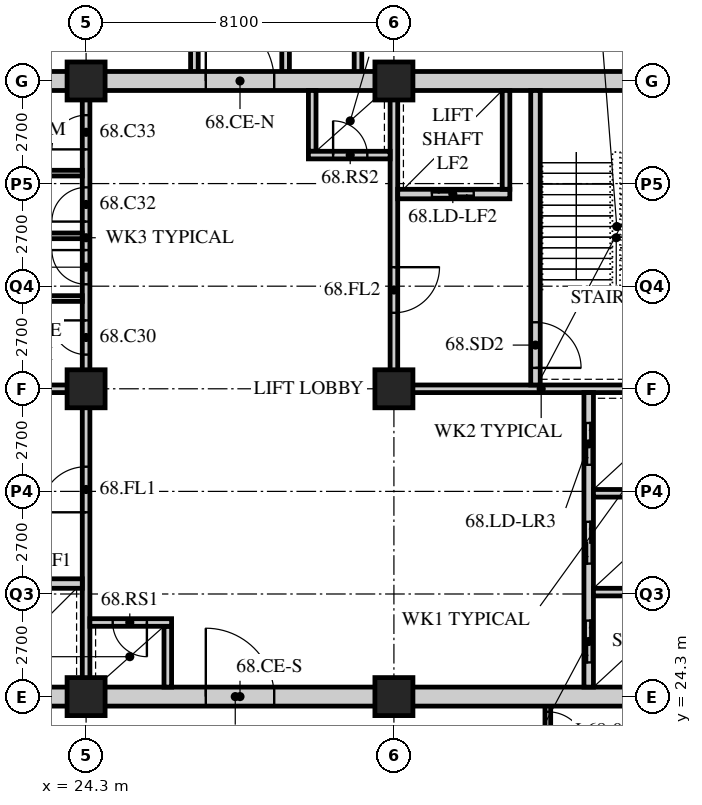
"""IFC4 building model, lengths in metres.
Left out: names, types, materials, properties, quantities, classifications, styles, units other than length and angle.
Written with IfcOpenShell. Run it as: python <this file> out.ifc"""

import sys

from ifc_helpers import new_model, si_unit, direction, frame, frame_2d, origin, origin_2d, place, context, subcontext, project, spatial, rectangle, hollow_rectangle, extrude, element, fill, save


model = new_model("IFC4")
c1 = context("Model", 3, precision=1e-05, world=origin(), true_north=direction((0.0, 1.0)))
c2 = subcontext(c1, "Body", "Model", "MODEL_VIEW")
j1 = project(units=[si_unit("LENGTHUNIT", "METRE"), si_unit("PLANEANGLEUNIT", "RADIAN")], contexts=[c1])
p1 = place(None, origin())
s1 = spatial("IfcSite", under=j1, at=p1, CompositionType="ELEMENT")
p2 = place(p1, origin())
s2 = spatial("IfcBuilding", under=s1, at=p2, CompositionType="ELEMENT")
p3 = place(p2, frame((0.0, 0.0, 265.8)))
s3 = spatial("IfcBuildingStorey", under=s2, at=p3, CompositionType="ELEMENT", Elevation=265.8)
for number, where, z_axis, x_axis in (
    (1, (24.3, 24.3, 0.0), (0.0, 0.0, 1.0), (1.0, 0.0, 0.0)),
    (2, (24.3, 32.4, 0.0), (0.0, 0.0, 1.0), (1.0, 0.0, 0.0)),
    (3, (24.3, 40.5, 0.0), (0.0, 0.0, 1.0), (1.0, 0.0, 0.0)),
    (4, (32.4, 24.3, 0.0), (0.0, 0.0, 1.0), (1.0, 0.0, 0.0)),
    (5, (32.4, 32.4, 0.0), (0.0, 0.0, 1.0), (1.0, 0.0, 0.0)),
    (6, (32.4, 40.5, 0.0), (0.0, 0.0, 1.0), (1.0, 0.0, 0.0)),
):
    element("IfcColumn", number, at=place(p3, frame(where, z_axis=z_axis, x_axis=x_axis)), inside=s3, PredefinedType="COLUMN", context=c2, shape_type="SweptSolid", body=[
        extrude(hollow_rectangle(XDim=1.0, YDim=1.0, WallThickness=0.1, at=origin_2d()), origin(), (0.0, 0.0, 1.0), 3.9),
    ])
for number, where, z_axis, x_axis in (
    (7, (31.455, 46.8, 0.0), (0.0, 0.0, 1.0), (0.0, -1.0, 0.0)),
    (8, (27.15, 40.5, 0.0), (0.0, 0.0, 1.0), (0.0, 1.0, 0.0)),
    (9, (29.55, 40.5, 0.0), (0.0, 0.0, 1.0), (0.0, 1.0, 0.0)),
):
    element("IfcWall", number, at=place(p3, frame(where, z_axis=z_axis, x_axis=x_axis)), inside=s3, PredefinedType="SOLIDWALL", context=c2, shape_type="SweptSolid", body=[
        extrude(rectangle(XDim=6.3, YDim=0.2, at=frame_2d((3.15, 0.0))), origin(), (0.0, 0.0, 1.0), 3.69),
    ])
p4 = place(p3, frame((36.45, 22.5, 0.0), z_axis=(0.0, 0.0, 1.0), x_axis=(0.0, 1.0, 0.0)))
e10 = element("IfcWall", 10, at=p4, inside=s3, PredefinedType="PARTITIONING", context=c2, shape_type="SweptSolid", body=[
    extrude(rectangle(XDim=1.8, YDim=0.15, at=frame_2d((0.9, 0.0))), origin(), (0.0, 0.0, 1.0), 3.69),
])
p5 = place(p4, frame((0.4, 0.0, 0.0)))
e11 = element("IfcOpeningElement", 11, at=p5, cuts=e10, PredefinedType="OPENING", context=c2, shape_type="SweptSolid", body=[
    extrude(rectangle(XDim=1.0, YDim=2.1, at=frame_2d((0.5, 1.05))), frame((0.0, 0.085, 0.0), z_axis=(0.0, -1.0, 0.0), x_axis=(1.0, 0.0, 0.0)), (0.0, 0.0, 1.0), 0.17),
])
p6 = place(p3, frame((15.95, 24.3, 0.0), z_axis=(0.0, 0.0, 1.0), x_axis=(1.0, 0.0, 0.0)))
e12 = element("IfcWall", 12, at=p6, inside=s3, PredefinedType="SOLIDWALL", context=c2, shape_type="SweptSolid", body=[
    extrude(rectangle(XDim=24.55, YDim=0.5, at=frame_2d((12.275, 0.0))), origin(), (0.0, 0.0, 1.0), 3.04),
])
p7 = place(p6, frame((11.5, 0.0, 0.0)))
e13 = element("IfcOpeningElement", 13, at=p7, cuts=e12, PredefinedType="OPENING", context=c2, shape_type="SweptSolid", body=[
    extrude(rectangle(XDim=1.8, YDim=2.4, at=frame_2d((0.9, 1.2))), frame((0.0, 0.26, 0.0), z_axis=(0.0, -1.0, 0.0), x_axis=(1.0, 0.0, 0.0)), (0.0, 0.0, 1.0), 0.52),
])
p8 = place(p3, frame((15.95, 40.5, 0.0), z_axis=(0.0, 0.0, 1.0), x_axis=(1.0, 0.0, 0.0)))
e14 = element("IfcWall", 14, at=p8, inside=s3, PredefinedType="SOLIDWALL", context=c2, shape_type="SweptSolid", body=[
    extrude(rectangle(XDim=24.55, YDim=0.5, at=frame_2d((12.275, 0.0))), origin(), (0.0, 0.0, 1.0), 3.04),
])
p9 = place(p8, frame((11.5, 0.0, 0.0)))
e15 = element("IfcOpeningElement", 15, at=p9, cuts=e14, PredefinedType="OPENING", context=c2, shape_type="SweptSolid", body=[
    extrude(rectangle(XDim=1.8, YDim=2.4, at=frame_2d((0.9, 1.2))), frame((0.0, 0.26, 0.0), z_axis=(0.0, -1.0, 0.0), x_axis=(1.0, 0.0, 0.0)), (0.0, 0.0, 1.0), 0.52),
])
p10 = place(p3, frame((16.45, 32.4, 0.0), z_axis=(0.0, 0.0, 1.0), x_axis=(1.0, 0.0, 0.0)))
e16 = element("IfcWall", 16, at=p10, inside=s3, PredefinedType="SOLIDWALL", context=c2, shape_type="SweptSolid", body=[
    extrude(rectangle(XDim=7.95, YDim=0.2, at=frame_2d((3.975, 0.0))), origin(), (0.0, 0.0, 1.0), 3.078),
])
p11 = place(p3, frame((24.3, 24.55, 0.0), z_axis=(0.0, 0.0, 1.0), x_axis=(0.0, 1.0, 0.0)))
e17 = element("IfcWall", 17, at=p11, inside=s3, PredefinedType="SOLIDWALL", context=c2, shape_type="SweptSolid", body=[
    extrude(rectangle(XDim=7.75, YDim=0.2, at=frame_2d((3.875, 0.0))), origin(), (0.0, 0.0, 1.0), 3.078),
])
p12 = place(p11, frame((4.6, 0.0, 0.0)))
e18 = element("IfcOpeningElement", 18, at=p12, cuts=e17, PredefinedType="OPENING", context=c2, shape_type="SweptSolid", body=[
    extrude(rectangle(XDim=1.2, YDim=2.1, at=frame_2d((0.6, 1.05))), frame((0.0, 0.11, 0.0), z_axis=(0.0, -1.0, 0.0), x_axis=(1.0, 0.0, 0.0)), (0.0, 0.0, 1.0), 0.22),
])
p13 = place(p3, frame((21.25, 27.275, 0.0), z_axis=(0.0, 0.0, 1.0), x_axis=(1.0, 0.0, 0.0)))
e19 = element("IfcWall", 19, at=p13, inside=s3, PredefinedType="SOLIDWALL", context=c2, shape_type="SweptSolid", body=[
    extrude(rectangle(XDim=2.95, YDim=0.25, at=frame_2d((1.475, 0.0))), origin(), (0.0, 0.0, 1.0), 3.69),
])
p14 = place(p13, frame((0.95, 0.0, 0.0)))
e20 = element("IfcOpeningElement", 20, at=p14, cuts=e19, PredefinedType="OPENING", context=c2, shape_type="SweptSolid", body=[
    extrude(rectangle(XDim=1.1, YDim=2.4, at=frame_2d((0.55, 1.2))), frame((0.0, 0.135, 0.0), z_axis=(0.0, -1.0, 0.0), x_axis=(1.0, 0.0, 0.0)), (0.0, 0.0, 1.0), 0.27),
])
p15 = place(p3, frame((26.45, 24.55, 0.0), z_axis=(0.0, 0.0, 1.0), x_axis=(0.0, 1.0, 0.0)))
e21 = element("IfcWall", 21, at=p15, inside=s3, PredefinedType="SOLIDWALL", context=c2, shape_type="SweptSolid", body=[
    extrude(rectangle(XDim=1.6, YDim=0.2, at=frame_2d((0.8, 0.0))), origin(), (0.0, 0.0, 1.0), 3.69),
])
p16 = place(p3, frame((24.4, 26.25, 0.0), z_axis=(0.0, 0.0, 1.0), x_axis=(1.0, 0.0, 0.0)))
e22 = element("IfcWall", 22, at=p16, inside=s3, PredefinedType="SOLIDWALL", context=c2, shape_type="SweptSolid", body=[
    extrude(rectangle(XDim=2.15, YDim=0.2, at=frame_2d((1.075, 0.0))), origin(), (0.0, 0.0, 1.0), 3.69),
])
p17 = place(p16, frame((0.6, 0.0, 0.0)))
e23 = element("IfcOpeningElement", 23, at=p17, cuts=e22, PredefinedType="OPENING", context=c2, shape_type="SweptSolid", body=[
    extrude(rectangle(XDim=0.9, YDim=2.1, at=frame_2d((0.45, 1.05))), frame((0.0, 0.11, 0.0), z_axis=(0.0, -1.0, 0.0), x_axis=(1.0, 0.0, 0.0)), (0.0, 0.0, 1.0), 0.22),
])
p18 = place(p3, frame((32.3, 32.4, 0.0), z_axis=(0.0, 0.0, 1.0), x_axis=(1.0, 0.0, 0.0)))
e24 = element("IfcWall", 24, at=p18, inside=s3, PredefinedType="SOLIDWALL", context=c2, shape_type="SweptSolid", body=[
    extrude(rectangle(XDim=7.95, YDim=0.2, at=frame_2d((3.975, 0.0))), origin(), (0.0, 0.0, 1.0), 3.078),
])
p19 = place(p3, frame((32.4, 32.5, 0.0), z_axis=(0.0, 0.0, 1.0), x_axis=(0.0, 1.0, 0.0)))
e25 = element("IfcWall", 25, at=p19, inside=s3, PredefinedType="SOLIDWALL", context=c2, shape_type="SweptSolid", body=[
    extrude(rectangle(XDim=7.75, YDim=0.2, at=frame_2d((3.875, 0.0))), origin(), (0.0, 0.0, 1.0), 3.078),
])
p20 = place(p19, frame((1.9, 0.0, 0.0)))
e26 = element("IfcOpeningElement", 26, at=p20, cuts=e25, PredefinedType="OPENING", context=c2, shape_type="SweptSolid", body=[
    extrude(rectangle(XDim=1.2, YDim=2.1, at=frame_2d((0.6, 1.05))), frame((0.0, 0.11, 0.0), z_axis=(0.0, -1.0, 0.0), x_axis=(1.0, 0.0, 0.0)), (0.0, 0.0, 1.0), 0.22),
])
p21 = place(p3, frame((37.525, 24.55, 0.0), z_axis=(0.0, 0.0, 1.0), x_axis=(0.0, 1.0, 0.0)))
e27 = element("IfcWall", 27, at=p21, inside=s3, PredefinedType="SOLIDWALL", context=c2, shape_type="SweptSolid", body=[
    extrude(rectangle(XDim=7.75, YDim=0.25, at=frame_2d((3.875, 0.0))), origin(), (0.0, 0.0, 1.0), 3.69),
])
p22 = place(p21, frame((0.65, 0.0, 0.0)))
e28 = element("IfcOpeningElement", 28, at=p22, cuts=e27, PredefinedType="OPENING", context=c2, shape_type="SweptSolid", body=[
    extrude(rectangle(XDim=1.1, YDim=2.4, at=frame_2d((0.55, 1.2))), frame((0.0, 0.135, 0.0), z_axis=(0.0, -1.0, 0.0), x_axis=(1.0, 0.0, 0.0)), (0.0, 0.0, 1.0), 0.27),
])
p23 = place(p21, frame((3.25, 0.0, 0.0)))
e29 = element("IfcOpeningElement", 29, at=p23, cuts=e27, PredefinedType="OPENING", context=c2, shape_type="SweptSolid", body=[
    extrude(rectangle(XDim=1.1, YDim=2.4, at=frame_2d((0.55, 1.2))), frame((0.0, 0.135, 0.0), z_axis=(0.0, -1.0, 0.0), x_axis=(1.0, 0.0, 0.0)), (0.0, 0.0, 1.0), 0.27),
])
p24 = place(p21, frame((5.85, 0.0, 0.0)))
e30 = element("IfcOpeningElement", 30, at=p24, cuts=e27, PredefinedType="OPENING", context=c2, shape_type="SweptSolid", body=[
    extrude(rectangle(XDim=1.1, YDim=2.4, at=frame_2d((0.55, 1.2))), frame((0.0, 0.135, 0.0), z_axis=(0.0, -1.0, 0.0), x_axis=(1.0, 0.0, 0.0)), (0.0, 0.0, 1.0), 0.27),
])
for number, where, z_axis, x_axis in (
    (31, (37.65, 27.05, 0.0), (0.0, 0.0, 1.0), (1.0, 0.0, 0.0)),
    (32, (37.65, 29.65, 0.0), (0.0, 0.0, 1.0), (1.0, 0.0, 0.0)),
):
    element("IfcWall", number, at=place(p3, frame(where, z_axis=z_axis, x_axis=x_axis)), inside=s3, PredefinedType="SOLIDWALL", context=c2, shape_type="SweptSolid", body=[
        extrude(rectangle(XDim=2.6, YDim=0.2, at=frame_2d((1.3, 0.0))), origin(), (0.0, 0.0, 1.0), 3.69),
    ])
p25 = place(p3, frame((36.125, 32.5, 0.0), z_axis=(0.0, 0.0, 1.0), x_axis=(0.0, 1.0, 0.0)))
e33 = element("IfcWall", 33, at=p25, inside=s3, PredefinedType="SOLIDWALL", context=c2, shape_type="SweptSolid", body=[
    extrude(rectangle(XDim=7.75, YDim=0.25, at=frame_2d((3.875, 0.0))), origin(), (0.0, 0.0, 1.0), 3.69),
])
p26 = place(p25, frame((0.45, 0.0, 0.0)))
e34 = element("IfcOpeningElement", 34, at=p26, cuts=e33, PredefinedType="OPENING", context=c2, shape_type="SweptSolid", body=[
    extrude(rectangle(XDim=1.2, YDim=2.1, at=frame_2d((0.6, 1.05))), frame((0.0, 0.135, 0.0), z_axis=(0.0, -1.0, 0.0), x_axis=(1.0, 0.0, 0.0)), (0.0, 0.0, 1.0), 0.27),
])
p27 = place(p3, frame((32.5, 37.525, 0.0), z_axis=(0.0, 0.0, 1.0), x_axis=(1.0, 0.0, 0.0)))
e35 = element("IfcWall", 35, at=p27, inside=s3, PredefinedType="SOLIDWALL", context=c2, shape_type="SweptSolid", body=[
    extrude(rectangle(XDim=2.95, YDim=0.25, at=frame_2d((1.475, 0.0))), origin(), (0.0, 0.0, 1.0), 3.69),
])
p28 = place(p27, frame((0.9, 0.0, 0.0)))
e36 = element("IfcOpeningElement", 36, at=p28, cuts=e35, PredefinedType="OPENING", context=c2, shape_type="SweptSolid", body=[
    extrude(rectangle(XDim=1.1, YDim=2.4, at=frame_2d((0.55, 1.2))), frame((0.0, 0.135, 0.0), z_axis=(0.0, -1.0, 0.0), x_axis=(1.0, 0.0, 0.0)), (0.0, 0.0, 1.0), 0.27),
])
p29 = place(p3, frame((35.35, 37.65, 0.0), z_axis=(0.0, 0.0, 1.0), x_axis=(0.0, 1.0, 0.0)))
e37 = element("IfcWall", 37, at=p29, inside=s3, PredefinedType="SOLIDWALL", context=c2, shape_type="SweptSolid", body=[
    extrude(rectangle(XDim=2.6, YDim=0.2, at=frame_2d((1.3, 0.0))), origin(), (0.0, 0.0, 1.0), 3.69),
])
p30 = place(p3, frame((30.25, 38.65, 0.0), z_axis=(0.0, 0.0, 1.0), x_axis=(0.0, 1.0, 0.0)))
e38 = element("IfcWall", 38, at=p30, inside=s3, PredefinedType="SOLIDWALL", context=c2, shape_type="SweptSolid", body=[
    extrude(rectangle(XDim=1.6, YDim=0.2, at=frame_2d((0.8, 0.0))), origin(), (0.0, 0.0, 1.0), 3.69),
])
p31 = place(p3, frame((30.15, 38.55, 0.0), z_axis=(0.0, 0.0, 1.0), x_axis=(1.0, 0.0, 0.0)))
e39 = element("IfcWall", 39, at=p31, inside=s3, PredefinedType="SOLIDWALL", context=c2, shape_type="SweptSolid", body=[
    extrude(rectangle(XDim=2.15, YDim=0.2, at=frame_2d((1.075, 0.0))), origin(), (0.0, 0.0, 1.0), 3.69),
])
p32 = place(p31, frame((0.65, 0.0, 0.0)))
e40 = element("IfcOpeningElement", 40, at=p32, cuts=e39, PredefinedType="OPENING", context=c2, shape_type="SweptSolid", body=[
    extrude(rectangle(XDim=0.9, YDim=2.1, at=frame_2d((0.45, 1.05))), frame((0.0, 0.11, 0.0), z_axis=(0.0, -1.0, 0.0), x_axis=(1.0, 0.0, 0.0)), (0.0, 0.0, 1.0), 0.22),
])
p33 = place(p3, frame((24.3, 32.5, 0.0), z_axis=(0.0, 0.0, 1.0), x_axis=(0.0, 1.0, 0.0)))
e41 = element("IfcWall", 41, at=p33, inside=s3, PredefinedType="PARTITIONING", context=c2, shape_type="SweptSolid", body=[
    extrude(rectangle(XDim=7.75, YDim=0.2, at=frame_2d((3.875, 0.0))), origin(), (0.0, 0.0, 1.0), 3.078),
])
p34 = place(p33, frame((0.8, 0.0, 0.0)))
e42 = element("IfcOpeningElement", 42, at=p34, cuts=e41, PredefinedType="OPENING", context=c2, shape_type="SweptSolid", body=[
    extrude(rectangle(XDim=0.9, YDim=2.1, at=frame_2d((0.45, 1.05))), frame((0.0, 0.11, 0.0), z_axis=(0.0, -1.0, 0.0), x_axis=(1.0, 0.0, 0.0)), (0.0, 0.0, 1.0), 0.22),
])
p35 = place(p33, frame((2.65, 0.0, 0.0)))
e43 = element("IfcOpeningElement", 43, at=p35, cuts=e41, PredefinedType="OPENING", context=c2, shape_type="SweptSolid", body=[
    extrude(rectangle(XDim=0.9, YDim=2.1, at=frame_2d((0.45, 1.05))), frame((0.0, 0.11, 0.0), z_axis=(0.0, -1.0, 0.0), x_axis=(1.0, 0.0, 0.0)), (0.0, 0.0, 1.0), 0.22),
])
p36 = place(p33, frame((4.3, 0.0, 0.0)))
e44 = element("IfcOpeningElement", 44, at=p36, cuts=e41, PredefinedType="OPENING", context=c2, shape_type="SweptSolid", body=[
    extrude(rectangle(XDim=0.9, YDim=2.1, at=frame_2d((0.45, 1.05))), frame((0.0, 0.11, 0.0), z_axis=(0.0, -1.0, 0.0), x_axis=(1.0, 0.0, 0.0)), (0.0, 0.0, 1.0), 0.22),
])
p37 = place(p33, frame((6.2, 0.0, 0.0)))
e45 = element("IfcOpeningElement", 45, at=p37, cuts=e41, PredefinedType="OPENING", context=c2, shape_type="SweptSolid", body=[
    extrude(rectangle(XDim=0.9, YDim=2.1, at=frame_2d((0.45, 1.05))), frame((0.0, 0.11, 0.0), z_axis=(0.0, -1.0, 0.0), x_axis=(1.0, 0.0, 0.0)), (0.0, 0.0, 1.0), 0.22),
])
for number, where, z_axis, x_axis in (
    (46, (21.05, 34.775, 0.0), (0.0, 0.0, 1.0), (1.0, 0.0, 0.0)),
    (47, (21.05, 36.425, 0.0), (0.0, 0.0, 1.0), (1.0, 0.0, 0.0)),
):
    element("IfcWall", number, at=place(p3, frame(where, z_axis=z_axis, x_axis=x_axis)), inside=s3, PredefinedType="PARTITIONING", context=c2, shape_type="SweptSolid", body=[
        extrude(rectangle(XDim=3.15, YDim=0.15, at=frame_2d((1.575, 0.0))), origin(), (0.0, 0.0, 1.0), 3.69),
    ])
p38 = place(p3, frame((21.2, 38.075, 0.0), z_axis=(0.0, 0.0, 1.0), x_axis=(1.0, 0.0, 0.0)))
e48 = element("IfcWall", 48, at=p38, inside=s3, PredefinedType="PARTITIONING", context=c2, shape_type="SweptSolid", body=[
    extrude(rectangle(XDim=3.0, YDim=0.15, at=frame_2d((1.5, 0.0))), origin(), (0.0, 0.0, 1.0), 3.69),
])
p39 = place(p5, origin())
e49 = element("IfcDoor", 49, at=p39, inside=s3, OperationType="SINGLE_SWING_RIGHT", PredefinedType="DOOR", context=c2, shape_type="SweptSolid", body=[
    extrude(rectangle(XDim=1.0, YDim=2.1, at=frame_2d((0.5, 1.05))), frame((0.0, 0.025, 0.0), z_axis=(0.0, -1.0, 0.0), x_axis=(1.0, 0.0, 0.0)), (0.0, 0.0, 1.0), 0.05),
])
fill(e11, e49)
p40 = place(p34, origin())
e50 = element("IfcDoor", 50, at=p40, inside=s3, OperationType="SINGLE_SWING_RIGHT", PredefinedType="DOOR", context=c2, shape_type="SweptSolid", body=[
    extrude(rectangle(XDim=0.9, YDim=2.1, at=frame_2d((0.45, 1.05))), frame((0.0, 0.025, 0.0), z_axis=(0.0, -1.0, 0.0), x_axis=(1.0, 0.0, 0.0)), (0.0, 0.0, 1.0), 0.05),
])
fill(e42, e50)
p41 = place(p35, origin())
e51 = element("IfcDoor", 51, at=p41, inside=s3, OperationType="SINGLE_SWING_RIGHT", PredefinedType="DOOR", context=c2, shape_type="SweptSolid", body=[
    extrude(rectangle(XDim=0.9, YDim=2.1, at=frame_2d((0.45, 1.05))), frame((0.0, 0.025, 0.0), z_axis=(0.0, -1.0, 0.0), x_axis=(1.0, 0.0, 0.0)), (0.0, 0.0, 1.0), 0.05),
])
fill(e43, e51)
p42 = place(p36, origin())
e52 = element("IfcDoor", 52, at=p42, inside=s3, OperationType="SINGLE_SWING_LEFT", PredefinedType="DOOR", context=c2, shape_type="SweptSolid", body=[
    extrude(rectangle(XDim=0.9, YDim=2.1, at=frame_2d((0.45, 1.05))), frame((0.0, 0.025, 0.0), z_axis=(0.0, -1.0, 0.0), x_axis=(1.0, 0.0, 0.0)), (0.0, 0.0, 1.0), 0.05),
])
fill(e44, e52)
p43 = place(p37, origin())
e53 = element("IfcDoor", 53, at=p43, inside=s3, OperationType="SINGLE_SWING_LEFT", PredefinedType="DOOR", context=c2, shape_type="SweptSolid", body=[
    extrude(rectangle(XDim=0.9, YDim=2.1, at=frame_2d((0.45, 1.05))), frame((0.0, 0.025, 0.0), z_axis=(0.0, -1.0, 0.0), x_axis=(1.0, 0.0, 0.0)), (0.0, 0.0, 1.0), 0.05),
])
fill(e45, e53)
p44 = place(p12, origin())
e54 = element("IfcDoor", 54, at=p44, inside=s3, OperationType="SINGLE_SWING_LEFT", PredefinedType="DOOR", context=c2, shape_type="SweptSolid", body=[
    extrude(rectangle(XDim=1.2, YDim=2.1, at=frame_2d((0.6, 1.05))), frame((0.0, 0.025, 0.0), z_axis=(0.0, -1.0, 0.0), x_axis=(1.0, 0.0, 0.0)), (0.0, 0.0, 1.0), 0.05),
])
fill(e18, e54)
p45 = place(p17, origin())
e55 = element("IfcDoor", 55, at=p45, inside=s3, OperationType="SINGLE_SWING_LEFT", PredefinedType="DOOR", context=c2, shape_type="SweptSolid", body=[
    extrude(rectangle(XDim=0.9, YDim=2.1, at=frame_2d((0.45, 1.05))), frame((0.0, 0.025, 0.0), z_axis=(0.0, -1.0, 0.0), x_axis=(1.0, 0.0, 0.0)), (0.0, 0.0, 1.0), 0.05),
])
fill(e23, e55)
p46 = place(p26, origin())
e56 = element("IfcDoor", 56, at=p46, inside=s3, OperationType="SINGLE_SWING_RIGHT", PredefinedType="DOOR", context=c2, shape_type="SweptSolid", body=[
    extrude(rectangle(XDim=1.2, YDim=2.1, at=frame_2d((0.6, 1.05))), frame((0.0, 0.025, 0.0), z_axis=(0.0, -1.0, 0.0), x_axis=(1.0, 0.0, 0.0)), (0.0, 0.0, 1.0), 0.05),
])
fill(e34, e56)
p47 = place(p20, origin())
e57 = element("IfcDoor", 57, at=p47, inside=s3, OperationType="SINGLE_SWING_LEFT", PredefinedType="DOOR", context=c2, shape_type="SweptSolid", body=[
    extrude(rectangle(XDim=1.2, YDim=2.1, at=frame_2d((0.6, 1.05))), frame((0.0, 0.025, 0.0), z_axis=(0.0, -1.0, 0.0), x_axis=(1.0, 0.0, 0.0)), (0.0, 0.0, 1.0), 0.05),
])
fill(e26, e57)
p48 = place(p32, origin())
e58 = element("IfcDoor", 58, at=p48, inside=s3, OperationType="SINGLE_SWING_LEFT", PredefinedType="DOOR", context=c2, shape_type="SweptSolid", body=[
    extrude(rectangle(XDim=0.9, YDim=2.1, at=frame_2d((0.45, 1.05))), frame((0.0, 0.025, 0.0), z_axis=(0.0, -1.0, 0.0), x_axis=(1.0, 0.0, 0.0)), (0.0, 0.0, 1.0), 0.05),
])
fill(e40, e58)
p49 = place(p22, origin())
e59 = element("IfcDoor", 59, at=p49, inside=s3, OperationType="DOUBLE_DOOR_SLIDING", PredefinedType="DOOR", context=c2, shape_type="SweptSolid", body=[
    extrude(rectangle(XDim=1.1, YDim=2.4, at=frame_2d((0.55, 1.2))), frame((0.0, 0.025, 0.0), z_axis=(0.0, -1.0, 0.0), x_axis=(1.0, 0.0, 0.0)), (0.0, 0.0, 1.0), 0.05),
])
fill(e28, e59)
p50 = place(p23, origin())
e60 = element("IfcDoor", 60, at=p50, inside=s3, OperationType="DOUBLE_DOOR_SLIDING", PredefinedType="DOOR", context=c2, shape_type="SweptSolid", body=[
    extrude(rectangle(XDim=1.1, YDim=2.4, at=frame_2d((0.55, 1.2))), frame((0.0, 0.025, 0.0), z_axis=(0.0, -1.0, 0.0), x_axis=(1.0, 0.0, 0.0)), (0.0, 0.0, 1.0), 0.05),
])
fill(e29, e60)
p51 = place(p24, origin())
e61 = element("IfcDoor", 61, at=p51, inside=s3, OperationType="DOUBLE_DOOR_SLIDING", PredefinedType="DOOR", context=c2, shape_type="SweptSolid", body=[
    extrude(rectangle(XDim=1.1, YDim=2.4, at=frame_2d((0.55, 1.2))), frame((0.0, 0.025, 0.0), z_axis=(0.0, -1.0, 0.0), x_axis=(1.0, 0.0, 0.0)), (0.0, 0.0, 1.0), 0.05),
])
fill(e30, e61)
p52 = place(p28, origin())
e62 = element("IfcDoor", 62, at=p52, inside=s3, OperationType="DOUBLE_DOOR_SLIDING", PredefinedType="DOOR", context=c2, shape_type="SweptSolid", body=[
    extrude(rectangle(XDim=1.1, YDim=2.4, at=frame_2d((0.55, 1.2))), frame((0.0, 0.025, 0.0), z_axis=(0.0, -1.0, 0.0), x_axis=(1.0, 0.0, 0.0)), (0.0, 0.0, 1.0), 0.05),
])
fill(e36, e62)
p53 = place(p7, origin())
e63 = element("IfcDoor", 63, at=p53, inside=s3, OperationType="DOUBLE_DOOR_SINGLE_SWING", PredefinedType="DOOR", context=c2, shape_type="SweptSolid", body=[
    extrude(rectangle(XDim=1.8, YDim=2.4, at=frame_2d((0.9, 1.2))), frame((0.0, 0.025, 0.0), z_axis=(0.0, -1.0, 0.0), x_axis=(1.0, 0.0, 0.0)), (0.0, 0.0, 1.0), 0.05),
])
fill(e13, e63)
p54 = place(p9, origin())
e64 = element("IfcDoor", 64, at=p54, inside=s3, OperationType="DOUBLE_DOOR_SINGLE_SWING", PredefinedType="DOOR", context=c2, shape_type="SweptSolid", body=[
    extrude(rectangle(XDim=1.8, YDim=2.4, at=frame_2d((0.9, 1.2))), frame((0.0, 0.025, 0.0), z_axis=(0.0, -1.0, 0.0), x_axis=(1.0, 0.0, 0.0)), (0.0, 0.0, 1.0), 0.05),
])
fill(e15, e64)
save(model, sys.argv[1])
